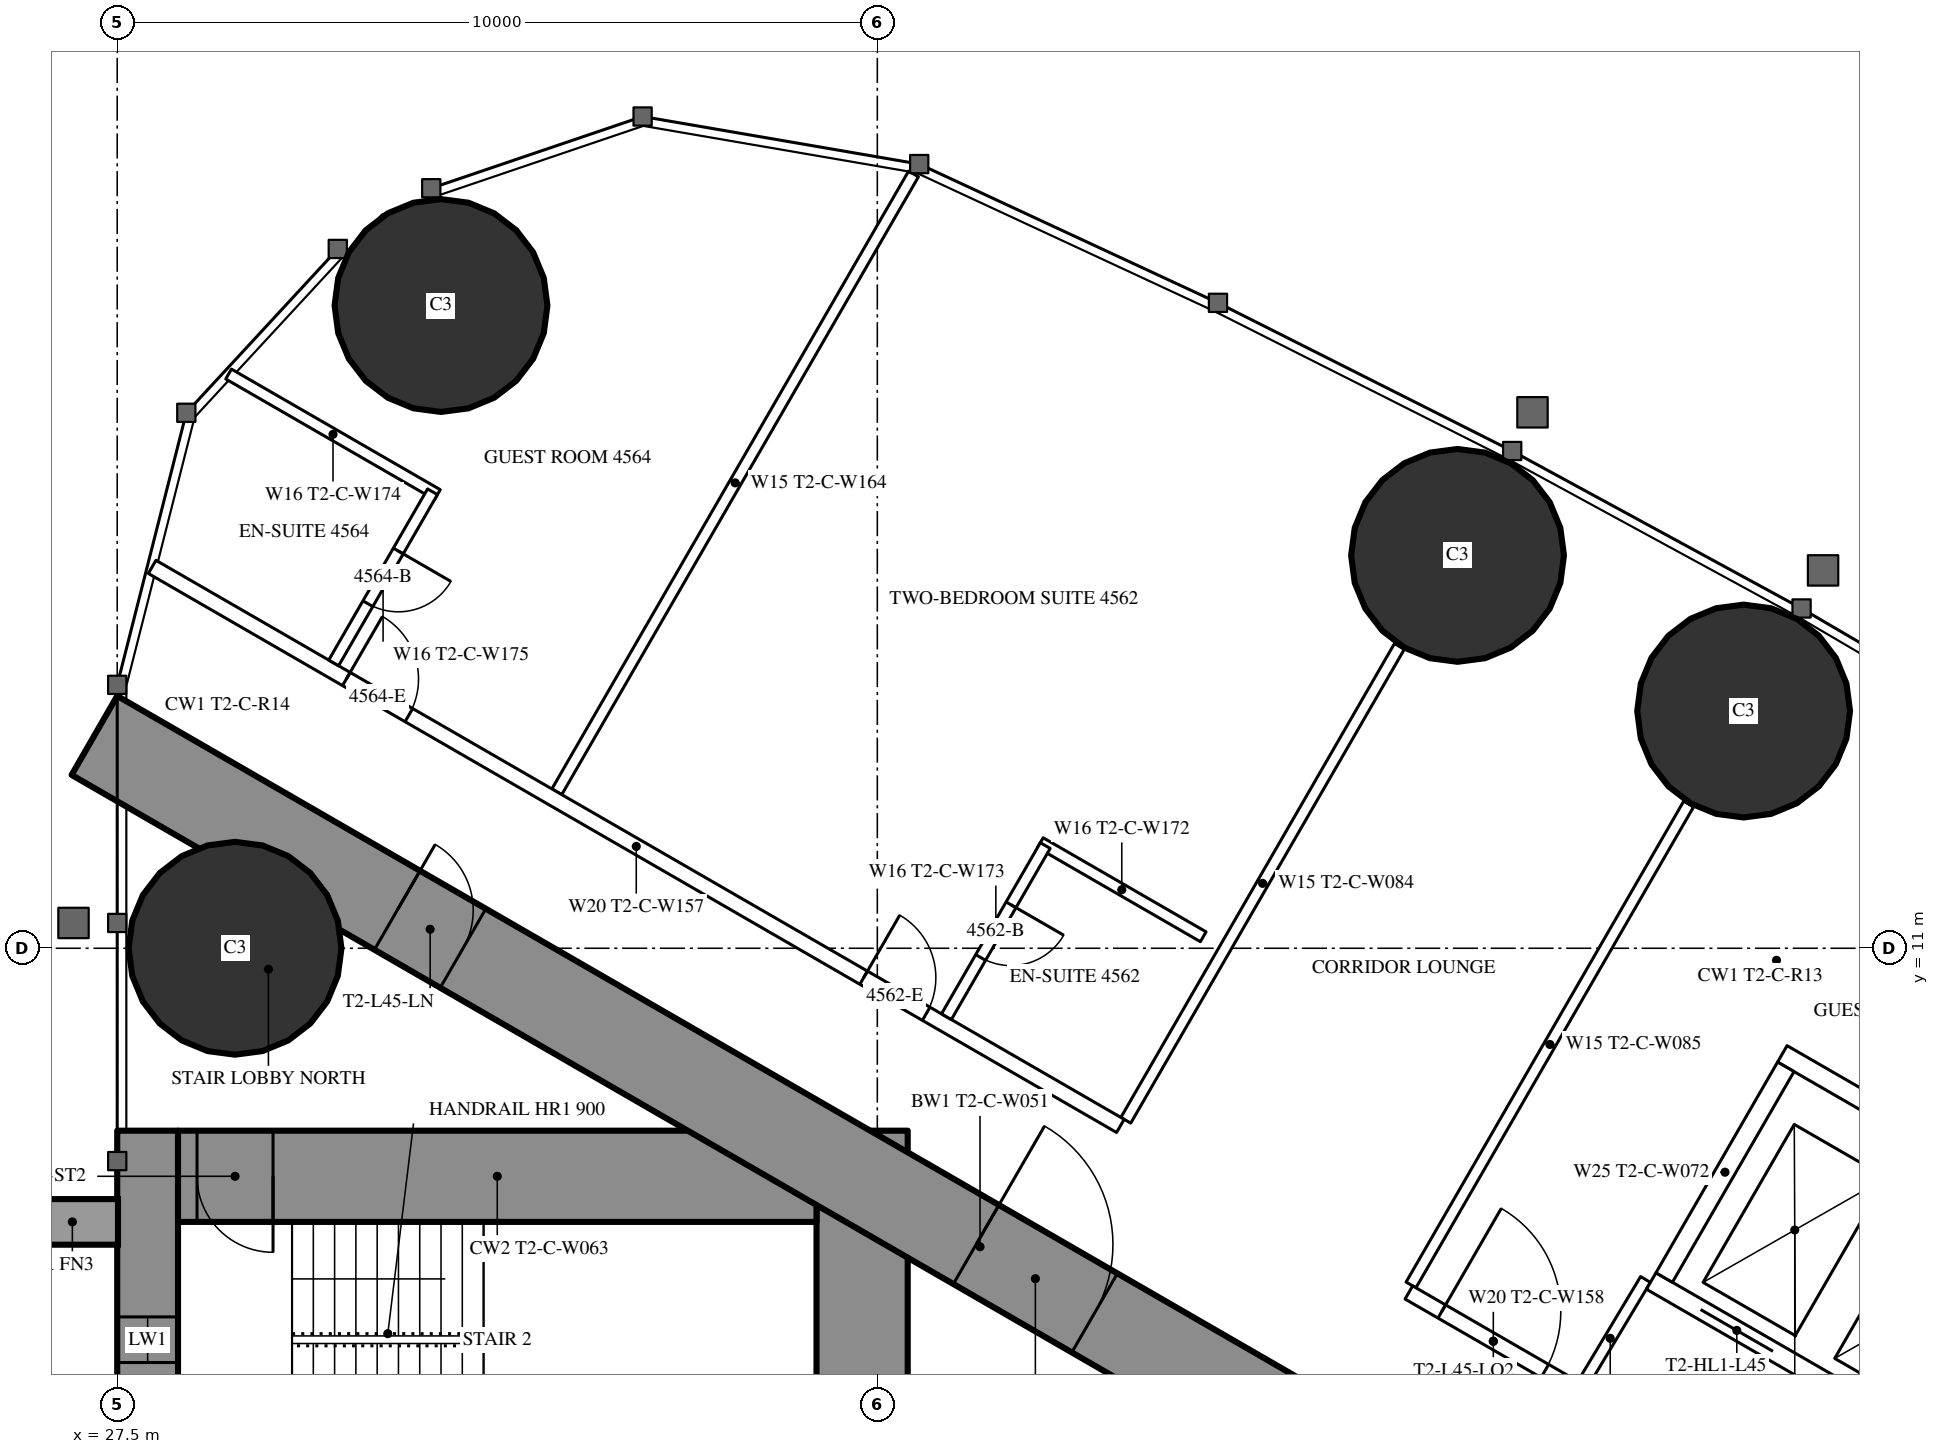
"""IFC4 building model, lengths in metres.
Left out: names, types, materials, properties, quantities, classifications, styles, units other than length and angle.
Written with IfcOpenShell. Run it as: python <this file> out.ifc"""

import sys

from ifc_helpers import new_model, si_unit, direction, frame, frame_2d, origin, origin_2d, place, context, subcontext, project, spatial, rectangle, circle, extrude, element, fill, save


model = new_model("IFC4")
c1 = context("Model", 3, precision=1e-05, world=origin(), true_north=direction((0.0, 1.0)))
c2 = subcontext(c1, "Body", "Model", "MODEL_VIEW")
j1 = project(units=[si_unit("LENGTHUNIT", "METRE"), si_unit("PLANEANGLEUNIT", "RADIAN")], contexts=[c1])
p1 = place(None, origin())
s1 = spatial("IfcSite", under=j1, at=p1, CompositionType="ELEMENT")
p2 = place(p1, origin())
s2 = spatial("IfcBuilding", under=s1, at=p2, CompositionType="ELEMENT")
p3 = place(p2, frame((0.0, 0.0, 170.3)))
s3 = spatial("IfcBuildingStorey", under=s2, at=p3, CompositionType="ELEMENT", Elevation=170.3)
for number, where, z_axis, x_axis in (
    (1, (31.76, 19.456, 0.0), (0.0, 0.0, 1.0), (1.0, 0.0, 0.0)),
    (2, (29.05, 11.0, 0.0), (0.0, 0.0, 1.0), (1.0, 0.0, 0.0)),
    (3, (48.897, 14.121, 0.0), (0.0, 0.0, 1.0), (1.0, 0.0, 0.0)),
    (4, (45.134, 16.168, 0.0), (0.0, 0.0, 1.0), (1.0, 0.0, 0.0)),
):
    element("IfcColumn", number, at=place(p3, frame(where, z_axis=z_axis, x_axis=x_axis)), inside=s3, PredefinedType="COLUMN", context=c2, shape_type="SweptSolid", body=[
        extrude(circle(Radius=1.4, at=origin_2d()), origin(), (0.0, 0.0, 1.0), 3.5),
    ])
p4 = place(p3, frame((27.9, -8.6, 0.0), z_axis=(0.0, 0.0, 1.0), x_axis=(0.0, 1.0, 0.0)))
e5 = element("IfcWall", 5, at=p4, inside=s3, PredefinedType="SHEAR", context=c2, shape_type="SweptSolid", body=[
    extrude(rectangle(XDim=17.2, YDim=0.8, at=frame_2d((8.6, 0.0))), origin(), (0.0, 0.0, 1.0), 3.5),
])
p5 = place(p4, frame((2.45, 0.0, 0.6)))
e6 = element("IfcOpeningElement", 6, at=p5, cuts=e5, PredefinedType="OPENING", context=c2, shape_type="SweptSolid", body=[
    extrude(rectangle(XDim=0.6, YDim=2.1, at=frame_2d((0.3, 1.05))), frame((0.0, 0.41, 0.0), z_axis=(0.0, -1.0, 0.0), x_axis=(1.0, 0.0, 0.0)), (0.0, 0.0, 1.0), 0.82),
])
p6 = place(p4, frame((14.15, 0.0, 0.6)))
e7 = element("IfcOpeningElement", 7, at=p6, cuts=e5, PredefinedType="OPENING", context=c2, shape_type="SweptSolid", body=[
    extrude(rectangle(XDim=0.6, YDim=2.1, at=frame_2d((0.3, 1.05))), frame((0.0, 0.41, 0.0), z_axis=(0.0, -1.0, 0.0), x_axis=(1.0, 0.0, 0.0)), (0.0, 0.0, 1.0), 0.82),
])
p7 = place(p3, frame((37.3, -8.6, 0.0), z_axis=(0.0, 0.0, 1.0), x_axis=(0.0, 1.0, 0.0)))
e8 = element("IfcWall", 8, at=p7, inside=s3, PredefinedType="SHEAR", context=c2, shape_type="SweptSolid", body=[
    extrude(rectangle(XDim=17.2, YDim=1.2, at=frame_2d((8.6, 0.0))), origin(), (0.0, 0.0, 1.0), 3.5),
])
p8 = place(p7, frame((7.7, 0.0, 0.0)))
e9 = element("IfcOpeningElement", 9, at=p8, cuts=e8, PredefinedType="OPENING", context=c2, shape_type="SweptSolid", body=[
    extrude(rectangle(XDim=1.8, YDim=2.2, at=frame_2d((0.9, 1.1))), frame((0.0, 0.61, 0.0), z_axis=(0.0, -1.0, 0.0), x_axis=(1.0, 0.0, 0.0)), (0.0, 0.0, 1.0), 1.22),
])
p9 = place(p3, frame((28.3, 8.0, 0.0), z_axis=(0.0, 0.0, 1.0), x_axis=(1.0, 0.0, 0.0)))
e10 = element("IfcWall", 10, at=p9, inside=s3, PredefinedType="SHEAR", context=c2, shape_type="SweptSolid", body=[
    extrude(rectangle(XDim=8.4, YDim=1.2, at=frame_2d((4.2, 0.0))), origin(), (0.0, 0.0, 1.0), 3.5),
])
p10 = place(p9, frame((0.25, 0.0, 0.0)))
e11 = element("IfcOpeningElement", 11, at=p10, cuts=e10, PredefinedType="OPENING", context=c2, shape_type="SweptSolid", body=[
    extrude(rectangle(XDim=1.0, YDim=2.2, at=frame_2d((0.5, 1.1))), frame((0.0, 0.61, 0.0), z_axis=(0.0, -1.0, 0.0), x_axis=(1.0, 0.0, 0.0)), (0.0, 0.0, 1.0), 1.22),
])
p11 = place(p3, frame((27.2, 13.8, 0.0), z_axis=(0.0, 0.0, 1.0), x_axis=(0.866024515034, -0.500001539357, 0.0)))
e12 = element("IfcWall", 12, at=p11, inside=s3, PredefinedType="SHEAR", context=c2, shape_type="SweptSolid", body=[
    extrude(rectangle(XDim=26.907, YDim=1.2, at=frame_2d((13.454, 0.0))), origin(), (0.0, 0.0, 1.0), 3.5),
])
p12 = place(p11, frame((4.6, 0.0, 0.0)))
e13 = element("IfcOpeningElement", 13, at=p12, cuts=e12, PredefinedType="OPENING", context=c2, shape_type="SweptSolid", body=[
    extrude(rectangle(XDim=1.0, YDim=2.2, at=frame_2d((0.5, 1.1))), frame((0.0, 0.61, 0.0), z_axis=(0.0, -1.0, 0.0), x_axis=(1.0, 0.0, 0.0)), (0.0, 0.0, 1.0), 1.22),
])
p13 = place(p11, frame((13.395, 0.0, 0.0)))
e14 = element("IfcOpeningElement", 14, at=p13, cuts=e12, PredefinedType="OPENING", context=c2, shape_type="SweptSolid", body=[
    extrude(rectangle(XDim=1.8, YDim=2.2, at=frame_2d((0.9, 1.1))), frame((0.0, 0.61, 0.0), z_axis=(0.0, -1.0, 0.0), x_axis=(1.0, 0.0, 0.0)), (0.0, 0.0, 1.0), 1.22),
])
p14 = place(p3, frame((33.284, 13.059, 0.0), z_axis=(0.0, 0.0, 1.0), x_axis=(0.499985904184, 0.866033541855, 0.0)))
e15 = element("IfcWall", 15, at=p14, inside=s3, PredefinedType="PARTITIONING", context=c2, shape_type="SweptSolid", body=[
    extrude(rectangle(XDim=9.385, YDim=0.15, at=frame_2d((4.693, 0.0))), origin(), (0.0, 0.0, 1.0), 3.25),
])
p15 = place(p3, frame((40.769, 8.737, 0.0), z_axis=(0.0, 0.0, 1.0), x_axis=(0.500013115284, 0.866017831539, 0.0)))
e16 = element("IfcWall", 16, at=p15, inside=s3, PredefinedType="PARTITIONING", context=c2, shape_type="SweptSolid", body=[
    extrude(rectangle(XDim=7.198, YDim=0.15, at=frame_2d((3.599, 0.0))), origin(), (0.0, 0.0, 1.0), 2.3),
])
p16 = place(p3, frame((44.521, 6.571, 0.0), z_axis=(0.0, 0.0, 1.0), x_axis=(0.500020376429, 0.866013639128, 0.0)))
e17 = element("IfcWall", 17, at=p16, inside=s3, PredefinedType="PARTITIONING", context=c2, shape_type="SweptSolid", body=[
    extrude(rectangle(XDim=7.306, YDim=0.15, at=frame_2d((3.653, 0.0))), origin(), (0.0, 0.0, 1.0), 2.3),
])
p17 = place(p3, frame((47.606, 6.643, 0.0), z_axis=(0.0, 0.0, 1.0), x_axis=(-0.514237157483, -0.857648031458, 0.0)))
e18 = element("IfcWall", 18, at=p17, inside=s3, PredefinedType="PARTITIONING", context=c2, shape_type="SweptSolid", body=[
    extrude(rectangle(XDim=1.805, YDim=0.15, at=frame_2d((0.902, 0.0))), origin(), (0.0, 0.0, 1.0), 3.25),
])
p18 = place(p3, frame((27.959, 16.017, 0.0), z_axis=(0.0, 0.0, 1.0), x_axis=(0.866024165033, -0.500002145574, 0.0)))
e19 = element("IfcWall", 19, at=p18, inside=s3, PredefinedType="PARTITIONING", context=c2, shape_type="SweptSolid", body=[
    extrude(rectangle(XDim=14.709, YDim=0.2, at=frame_2d((7.354, 0.0))), origin(), (0.0, 0.0, 1.0), 3.25),
])
p19 = place(p18, frame((10.809, 0.0, 0.0)))
e20 = element("IfcOpeningElement", 20, at=p19, cuts=e19, PredefinedType="OPENING", context=c2, shape_type="SweptSolid", body=[
    extrude(rectangle(XDim=0.95, YDim=2.2, at=frame_2d((0.475, 1.1))), frame((0.0, 0.11, 0.0), z_axis=(0.0, -1.0, 0.0), x_axis=(1.0, 0.0, 0.0)), (0.0, 0.0, 1.0), 0.22),
])
p20 = place(p18, frame((2.95, 0.0, 0.0)))
e21 = element("IfcOpeningElement", 21, at=p20, cuts=e19, PredefinedType="OPENING", context=c2, shape_type="SweptSolid", body=[
    extrude(rectangle(XDim=0.95, YDim=2.2, at=frame_2d((0.475, 1.1))), frame((0.0, 0.11, 0.0), z_axis=(0.0, -1.0, 0.0), x_axis=(1.0, 0.0, 0.0)), (0.0, 0.0, 1.0), 0.22),
])
p21 = place(p3, frame((44.493, 6.472, 0.0), z_axis=(0.0, 0.0, 1.0), x_axis=(0.866027140358, -0.499996992154, 0.0)))
e22 = element("IfcWall", 22, at=p21, inside=s3, PredefinedType="PARTITIONING", context=c2, shape_type="SweptSolid", body=[
    extrude(rectangle(XDim=2.566, YDim=0.2, at=frame_2d((1.283, 0.0))), origin(), (0.0, 0.0, 1.0), 3.25),
])
p22 = place(p21, frame((0.5, 0.0, 0.0)))
e23 = element("IfcOpeningElement", 23, at=p22, cuts=e22, PredefinedType="OPENING", context=c2, shape_type="SweptSolid", body=[
    extrude(rectangle(XDim=1.566, YDim=2.2, at=frame_2d((0.783, 1.1))), frame((0.0, 0.11, 0.0), z_axis=(0.0, -1.0, 0.0), x_axis=(1.0, 0.0, 0.0)), (0.0, 0.0, 1.0), 0.22),
])
p23 = place(p3, frame((39.645, 12.389, 0.0), z_axis=(0.0, 0.0, 1.0), x_axis=(0.866006523861, -0.500032699561, 0.0)))
e24 = element("IfcWall", 24, at=p23, inside=s3, PredefinedType="PARTITIONING", context=c2, shape_type="SweptSolid", body=[
    extrude(rectangle(XDim=2.475, YDim=0.15, at=frame_2d((1.237, 0.0))), origin(), (0.0, 0.0, 1.0), 3.25),
])
p24 = place(p3, frame((38.409, 10.099, 0.0), z_axis=(0.0, 0.0, 1.0), x_axis=(0.500006934395, 0.866021400173, 0.0)))
e25 = element("IfcWall", 25, at=p24, inside=s3, PredefinedType="PARTITIONING", context=c2, shape_type="SweptSolid", body=[
    extrude(rectangle(XDim=2.6, YDim=0.15, at=frame_2d((1.3, 0.0))), origin(), (0.0, 0.0, 1.0), 3.25),
])
p25 = place(p24, frame((0.9, 0.0, 0.0)))
e26 = element("IfcOpeningElement", 26, at=p25, cuts=e25, PredefinedType="OPENING", context=c2, shape_type="SweptSolid", body=[
    extrude(rectangle(XDim=0.8, YDim=2.2, at=frame_2d((0.4, 1.1))), frame((0.0, 0.085, 0.0), z_axis=(0.0, -1.0, 0.0), x_axis=(1.0, 0.0, 0.0)), (0.0, 0.0, 1.0), 0.17),
])
p26 = place(p3, frame((28.965, 18.554, 0.0), z_axis=(0.0, 0.0, 1.0), x_axis=(0.866008740531, -0.500028860491, 0.0)))
e27 = element("IfcWall", 27, at=p26, inside=s3, PredefinedType="PARTITIONING", context=c2, shape_type="SweptSolid", body=[
    extrude(rectangle(XDim=3.173, YDim=0.15, at=frame_2d((1.586, 0.0))), origin(), (0.0, 0.0, 1.0), 3.25),
])
p27 = place(p3, frame((30.348, 14.754, 0.0), z_axis=(0.0, 0.0, 1.0), x_axis=(0.500006934395, 0.866021400173, 0.0)))
e28 = element("IfcWall", 28, at=p27, inside=s3, PredefinedType="PARTITIONING", context=c2, shape_type="SweptSolid", body=[
    extrude(rectangle(XDim=2.6, YDim=0.15, at=frame_2d((1.3, 0.0))), origin(), (0.0, 0.0, 1.0), 2.3),
])
p28 = place(p27, frame((0.9, 0.0, 0.0)))
e29 = element("IfcOpeningElement", 29, at=p28, cuts=e28, PredefinedType="OPENING", context=c2, shape_type="SweptSolid", body=[
    extrude(rectangle(XDim=0.8, YDim=2.2, at=frame_2d((0.4, 1.1))), frame((0.0, 0.085, 0.0), z_axis=(0.0, -1.0, 0.0), x_axis=(1.0, 0.0, 0.0)), (0.0, 0.0, 1.0), 0.17),
])
p29 = place(p3, frame((47.681, 6.622, 0.0), z_axis=(0.0, 0.0, 1.0), x_axis=(0.86603344179, -0.499986077507, 0.0)))
e30 = element("IfcWall", 30, at=p29, inside=s3, PredefinedType="PARTITIONING", context=c2, shape_type="SweptSolid", body=[
    extrude(rectangle(XDim=6.6, YDim=0.25, at=frame_2d((3.3, 0.0))), origin(), (0.0, 0.0, 1.0), 3.25),
])
p30 = place(p29, frame((0.75, 0.0, 0.0)))
e31 = element("IfcOpeningElement", 31, at=p30, cuts=e30, PredefinedType="OPENING", context=c2, shape_type="SweptSolid", body=[
    extrude(rectangle(XDim=1.1, YDim=2.2, at=frame_2d((0.55, 1.1))), frame((0.0, 0.135, 0.0), z_axis=(0.0, -1.0, 0.0), x_axis=(1.0, 0.0, 0.0)), (0.0, 0.0, 1.0), 0.27),
])
p31 = place(p29, frame((2.75, 0.0, 0.0)))
e32 = element("IfcOpeningElement", 32, at=p31, cuts=e30, PredefinedType="OPENING", context=c2, shape_type="SweptSolid", body=[
    extrude(rectangle(XDim=1.1, YDim=2.2, at=frame_2d((0.55, 1.1))), frame((0.0, 0.135, 0.0), z_axis=(0.0, -1.0, 0.0), x_axis=(1.0, 0.0, 0.0)), (0.0, 0.0, 1.0), 0.27),
])
p32 = place(p29, frame((4.75, 0.0, 0.0)))
e33 = element("IfcOpeningElement", 33, at=p32, cuts=e30, PredefinedType="OPENING", context=c2, shape_type="SweptSolid", body=[
    extrude(rectangle(XDim=1.1, YDim=2.2, at=frame_2d((0.55, 1.1))), frame((0.0, 0.135, 0.0), z_axis=(0.0, -1.0, 0.0), x_axis=(1.0, 0.0, 0.0)), (0.0, 0.0, 1.0), 0.27),
])
p33 = place(p3, frame((49.406, 9.611, 0.0), z_axis=(0.0, 0.0, 1.0), x_axis=(0.86603344179, -0.499986077507, 0.0)))
e34 = element("IfcWall", 34, at=p33, inside=s3, PredefinedType="PARTITIONING", context=c2, shape_type="SweptSolid", body=[
    extrude(rectangle(XDim=6.6, YDim=0.25, at=frame_2d((3.3, 0.0))), origin(), (0.0, 0.0, 1.0), 3.25),
])
p34 = place(p3, frame((47.852, 6.668, 0.0), z_axis=(0.0, 0.0, 1.0), x_axis=(0.499929347863, 0.866066190972, 0.0)))
e35 = element("IfcWall", 35, at=p34, inside=s3, PredefinedType="PARTITIONING", context=c2, shape_type="SweptSolid", body=[
    extrude(rectangle(XDim=3.201, YDim=0.25, at=frame_2d((1.6, 0.0))), origin(), (0.0, 0.0, 1.0), 3.25),
])
p35 = place(p25, origin())
e36 = element("IfcDoor", 36, at=p35, inside=s3, OperationType="SINGLE_SWING_RIGHT", PredefinedType="DOOR", context=c2, shape_type="SweptSolid", body=[
    extrude(rectangle(XDim=0.8, YDim=2.2, at=frame_2d((0.4, 1.1))), frame((0.0, 0.025, 0.0), z_axis=(0.0, -1.0, 0.0), x_axis=(1.0, 0.0, 0.0)), (0.0, 0.0, 1.0), 0.05),
])
fill(e26, e36)
p36 = place(p19, origin())
e37 = element("IfcDoor", 37, at=p36, inside=s3, OperationType="SINGLE_SWING_LEFT", PredefinedType="DOOR", context=c2, shape_type="SweptSolid", body=[
    extrude(rectangle(XDim=0.95, YDim=2.2, at=frame_2d((0.475, 1.1))), frame((0.0, 0.025, 0.0), z_axis=(0.0, -1.0, 0.0), x_axis=(1.0, 0.0, 0.0)), (0.0, 0.0, 1.0), 0.05),
])
fill(e20, e37)
p37 = place(p28, origin())
e38 = element("IfcDoor", 38, at=p37, inside=s3, OperationType="SINGLE_SWING_RIGHT", PredefinedType="DOOR", context=c2, shape_type="SweptSolid", body=[
    extrude(rectangle(XDim=0.8, YDim=2.2, at=frame_2d((0.4, 1.1))), frame((0.0, 0.025, 0.0), z_axis=(0.0, -1.0, 0.0), x_axis=(1.0, 0.0, 0.0)), (0.0, 0.0, 1.0), 0.05),
])
fill(e29, e38)
p38 = place(p20, origin())
e39 = element("IfcDoor", 39, at=p38, inside=s3, OperationType="SINGLE_SWING_LEFT", PredefinedType="DOOR", context=c2, shape_type="SweptSolid", body=[
    extrude(rectangle(XDim=0.95, YDim=2.2, at=frame_2d((0.475, 1.1))), frame((0.0, 0.025, 0.0), z_axis=(0.0, -1.0, 0.0), x_axis=(1.0, 0.0, 0.0)), (0.0, 0.0, 1.0), 0.05),
])
fill(e21, e39)
p39 = place(p22, origin())
e40 = element("IfcDoor", 40, at=p39, inside=s3, OperationType="SINGLE_SWING_LEFT", PredefinedType="DOOR", context=c2, shape_type="SweptSolid", body=[
    extrude(rectangle(XDim=1.566, YDim=2.2, at=frame_2d((0.783, 1.1))), frame((0.0, 0.025, 0.0), z_axis=(0.0, -1.0, 0.0), x_axis=(1.0, 0.0, 0.0)), (0.0, 0.0, 1.0), 0.05),
])
fill(e23, e40)
p40 = place(p12, origin())
e41 = element("IfcDoor", 41, at=p40, inside=s3, OperationType="SINGLE_SWING_LEFT", PredefinedType="DOOR", context=c2, shape_type="SweptSolid", body=[
    extrude(rectangle(XDim=1.0, YDim=2.2, at=frame_2d((0.5, 1.1))), frame((0.0, 0.025, 0.0), z_axis=(0.0, -1.0, 0.0), x_axis=(1.0, 0.0, 0.0)), (0.0, 0.0, 1.0), 0.05),
])
fill(e13, e41)
p41 = place(p13, origin())
e42 = element("IfcDoor", 42, at=p41, inside=s3, OperationType="DOUBLE_DOOR_SINGLE_SWING", PredefinedType="DOOR", context=c2, shape_type="SweptSolid", body=[
    extrude(rectangle(XDim=1.8, YDim=2.2, at=frame_2d((0.9, 1.1))), frame((0.0, 0.025, 0.0), z_axis=(0.0, -1.0, 0.0), x_axis=(1.0, 0.0, 0.0)), (0.0, 0.0, 1.0), 0.05),
])
fill(e14, e42)
p42 = place(p10, origin())
e43 = element("IfcDoor", 43, at=p42, inside=s3, OperationType="SINGLE_SWING_RIGHT", PredefinedType="DOOR", context=c2, shape_type="SweptSolid", body=[
    extrude(rectangle(XDim=1.0, YDim=2.2, at=frame_2d((0.5, 1.1))), frame((0.0, 0.025, 0.0), z_axis=(0.0, -1.0, 0.0), x_axis=(1.0, 0.0, 0.0)), (0.0, 0.0, 1.0), 0.05),
])
fill(e11, e43)
p43 = place(p30, origin())
e44 = element("IfcDoor", 44, at=p43, inside=s3, OperationType="DOUBLE_DOOR_SLIDING", PredefinedType="USERDEFINED", context=c2, shape_type="SweptSolid", body=[
    extrude(rectangle(XDim=1.1, YDim=2.2, at=frame_2d((0.55, 1.1))), frame((0.0, 0.025, 0.0), z_axis=(0.0, -1.0, 0.0), x_axis=(1.0, 0.0, 0.0)), (0.0, 0.0, 1.0), 0.05),
])
fill(e31, e44)
p44 = place(p6, origin())
e45 = element("IfcWindow", 45, at=p44, inside=s3, PartitioningType="SINGLE_PANEL", PredefinedType="WINDOW", context=c2, shape_type="SweptSolid", body=[
    extrude(rectangle(XDim=0.6, YDim=2.1, at=frame_2d((0.3, 1.05))), frame((0.0, 0.03, 0.0), z_axis=(0.0, -1.0, 0.0), x_axis=(1.0, 0.0, 0.0)), (0.0, 0.0, 1.0), 0.06),
])
fill(e7, e45)
save(model, sys.argv[1])
